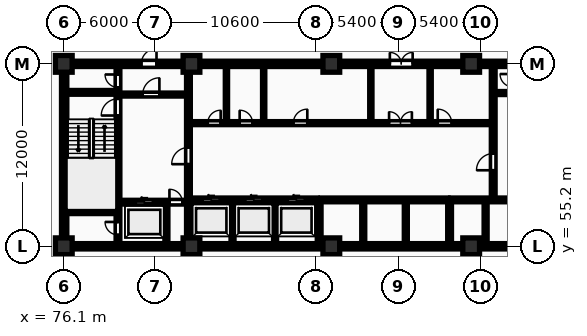
"""IFC4 building model, lengths in metres.
Left out: names, types, materials, properties, quantities, classifications, styles, units other than length and angle.
Written with IfcOpenShell. Run it as: python <this file> out.ifc"""

import sys

from ifc_helpers import new_model, si_unit, direction, frame, frame_2d, origin, origin_2d, place, context, subcontext, project, spatial, rectangle, extrude, element, fill, save


model = new_model("IFC4")
c1 = context("Model", 3, precision=1e-05, world=origin(), true_north=direction((0.0, 1.0)))
c2 = subcontext(c1, "Body", "Model", "MODEL_VIEW")
j1 = project(units=[si_unit("LENGTHUNIT", "METRE"), si_unit("PLANEANGLEUNIT", "RADIAN")], contexts=[c1])
p1 = place(None, origin())
s1 = spatial("IfcSite", under=j1, at=p1, CompositionType="ELEMENT")
p2 = place(p1, origin())
s2 = spatial("IfcBuilding", under=s1, at=p2, CompositionType="ELEMENT")
p3 = place(p2, frame((0.0, 0.0, -10.8)))
s3 = spatial("IfcBuildingStorey", under=s2, at=p3, CompositionType="ELEMENT", Elevation=-10.8)
for number, where, z_axis, x_axis in (
    (1, (76.1, 55.2, -0.45), (0.0, 0.0, 1.0), (1.0, 0.0, 0.0)),
    (2, (76.1, 67.2, -0.45), (0.0, 0.0, 1.0), (1.0, 0.0, 0.0)),
    (3, (84.5, 55.2, -0.45), (0.0, 0.0, 1.0), (1.0, 0.0, 0.0)),
    (4, (84.5, 67.2, -0.45), (0.0, 0.0, 1.0), (1.0, 0.0, 0.0)),
    (5, (93.7, 55.2, -0.45), (0.0, 0.0, 1.0), (1.0, 0.0, 0.0)),
    (6, (93.7, 67.2, -0.45), (0.0, 0.0, 1.0), (1.0, 0.0, 0.0)),
    (7, (102.9, 55.2, -0.45), (0.0, 0.0, 1.0), (1.0, 0.0, 0.0)),
    (8, (102.9, 67.2, -0.45), (0.0, 0.0, 1.0), (1.0, 0.0, 0.0)),
):
    element("IfcColumn", number, at=place(p3, frame(where, z_axis=z_axis, x_axis=x_axis)), inside=s3, PredefinedType="COLUMN", context=c2, shape_type="SweptSolid", body=[
        extrude(rectangle(XDim=1.1, YDim=1.1, at=origin_2d()), origin(), (0.0, 0.0, 1.0), 4.05),
    ])
p4 = place(p3, frame((75.95, 55.2, 0.0), z_axis=(0.0, 0.0, 1.0), x_axis=(1.0, 0.0, 0.0)))
e9 = element("IfcWall", 9, at=p4, inside=s3, PredefinedType="SHEAR", context=c2, shape_type="SweptSolid", body=[
    extrude(rectangle(XDim=36.3, YDim=0.35, at=frame_2d((18.15, 0.0))), origin(), (0.0, 0.0, 1.0), 3.6),
])
p5 = place(p3, frame((76.125, 55.375, 0.0), z_axis=(0.0, 0.0, 1.0), x_axis=(0.0, 1.0, 0.0)))
e10 = element("IfcWall", 10, at=p5, inside=s3, PredefinedType="SHEAR", context=c2, shape_type="SweptSolid", body=[
    extrude(rectangle(XDim=11.65, YDim=0.35, at=frame_2d((5.825, 0.0))), origin(), (0.0, 0.0, 1.0), 3.6),
])
p6 = place(p3, frame((75.95, 67.2, 0.0), z_axis=(0.0, 0.0, 1.0), x_axis=(1.0, 0.0, 0.0)))
e11 = element("IfcWall", 11, at=p6, inside=s3, PredefinedType="SHEAR", context=c2, shape_type="SweptSolid", body=[
    extrude(rectangle(XDim=36.3, YDim=0.35, at=frame_2d((18.15, 0.0))), origin(), (0.0, 0.0, 1.0), 3.6),
])
p7 = place(p6, frame((5.25, 0.0, 0.0)))
e12 = element("IfcOpeningElement", 12, at=p7, cuts=e11, PredefinedType="OPENING", context=c2, shape_type="SweptSolid", body=[
    extrude(rectangle(XDim=1.0, YDim=2.15, at=frame_2d((0.5, 1.075))), frame((0.0, 0.185, 0.0), z_axis=(0.0, -1.0, 0.0), x_axis=(1.0, 0.0, 0.0)), (0.0, 0.0, 1.0), 0.37),
])
p8 = place(p6, frame((21.6, 0.0, 0.0)))
e13 = element("IfcOpeningElement", 13, at=p8, cuts=e11, PredefinedType="OPENING", context=c2, shape_type="SweptSolid", body=[
    extrude(rectangle(XDim=1.5, YDim=2.2, at=frame_2d((0.75, 1.1))), frame((0.0, 0.185, 0.0), z_axis=(0.0, -1.0, 0.0), x_axis=(1.0, 0.0, 0.0)), (0.0, 0.0, 1.0), 0.37),
])
p9 = place(p6, frame((30.45, 0.0, 0.0)))
e14 = element("IfcOpeningElement", 14, at=p9, cuts=e11, PredefinedType="OPENING", context=c2, shape_type="SweptSolid", body=[
    extrude(rectangle(XDim=1.0, YDim=2.15, at=frame_2d((0.5, 1.075))), frame((0.0, 0.185, 0.0), z_axis=(0.0, -1.0, 0.0), x_axis=(1.0, 0.0, 0.0)), (0.0, 0.0, 1.0), 0.37),
])
p10 = place(p3, frame((79.665, 55.4, 0.0), z_axis=(0.0, 0.0, 1.0), x_axis=(0.0, 1.0, 0.0)))
e15 = element("IfcWall", 15, at=p10, inside=s3, PredefinedType="SHEAR", context=c2, shape_type="SweptSolid", body=[
    extrude(rectangle(XDim=11.6, YDim=0.25, at=frame_2d((5.8, 0.0))), origin(), (0.0, 0.0, 1.0), 3.6),
])
p11 = place(p10, frame((0.55, 0.0, 0.0)))
e16 = element("IfcOpeningElement", 16, at=p11, cuts=e15, PredefinedType="OPENING", context=c2, shape_type="SweptSolid", body=[
    extrude(rectangle(XDim=0.85, YDim=2.05, at=frame_2d((0.425, 1.025))), frame((0.0, 0.135, 0.0), z_axis=(0.0, -1.0, 0.0), x_axis=(1.0, 0.0, 0.0)), (0.0, 0.0, 1.0), 0.27),
])
p12 = place(p10, frame((8.4, 0.0, 0.0)))
e17 = element("IfcOpeningElement", 17, at=p12, cuts=e15, PredefinedType="OPENING", context=c2, shape_type="SweptSolid", body=[
    extrude(rectangle(XDim=1.1, YDim=2.1, at=frame_2d((0.55, 1.05))), frame((0.0, 0.135, 0.0), z_axis=(0.0, -1.0, 0.0), x_axis=(1.0, 0.0, 0.0)), (0.0, 0.0, 1.0), 0.27),
])
p13 = place(p10, frame((10.25, 0.0, 0.0)))
e18 = element("IfcOpeningElement", 18, at=p13, cuts=e15, PredefinedType="OPENING", context=c2, shape_type="SweptSolid", body=[
    extrude(rectangle(XDim=0.85, YDim=2.05, at=frame_2d((0.425, 1.025))), frame((0.0, 0.135, 0.0), z_axis=(0.0, -1.0, 0.0), x_axis=(1.0, 0.0, 0.0)), (0.0, 0.0, 1.0), 0.27),
])
for number, where, z_axis, x_axis in (
    (19, (76.3, 57.475, 0.0), (0.0, 0.0, 1.0), (1.0, 0.0, 0.0)),
    (20, (76.3, 65.325, 0.0), (0.0, 0.0, 1.0), (1.0, 0.0, 0.0)),
):
    element("IfcWall", number, at=place(p3, frame(where, z_axis=z_axis, x_axis=x_axis)), inside=s3, PredefinedType="SHEAR", context=c2, shape_type="SweptSolid", body=[
        extrude(rectangle(XDim=3.24, YDim=0.25, at=frame_2d((1.62, 0.0))), origin(), (0.0, 0.0, 1.0), 3.6),
    ])
p14 = place(p3, frame((79.79, 58.1, 0.0), z_axis=(0.0, 0.0, 1.0), x_axis=(1.0, 0.0, 0.0)))
e21 = element("IfcWall", 21, at=p14, inside=s3, PredefinedType="SHEAR", context=c2, shape_type="SweptSolid", body=[
    extrude(rectangle(XDim=4.39, YDim=0.25, at=frame_2d((2.195, 0.0))), origin(), (0.0, 0.0, 1.0), 3.6),
])
p15 = place(p14, frame((1.05, 0.0, 0.0)))
e22 = element("IfcOpeningElement", 22, at=p15, cuts=e21, PredefinedType="OPENING", context=c2, shape_type="SweptSolid", body=[
    extrude(rectangle(XDim=1.12, YDim=2.12, at=frame_2d((0.56, 1.06))), frame((0.0, 0.135, 0.0), z_axis=(0.0, -1.0, 0.0), x_axis=(1.0, 0.0, 0.0)), (0.0, 0.0, 1.0), 0.27),
])
p16 = place(p14, frame((3.26, 0.0, 0.0)))
e23 = element("IfcOpeningElement", 23, at=p16, cuts=e21, PredefinedType="OPENING", context=c2, shape_type="SweptSolid", body=[
    extrude(rectangle(XDim=0.85, YDim=2.05, at=frame_2d((0.425, 1.025))), frame((0.0, 0.135, 0.0), z_axis=(0.0, -1.0, 0.0), x_axis=(1.0, 0.0, 0.0)), (0.0, 0.0, 1.0), 0.27),
])
p17 = place(p3, frame((82.85, 55.4, 0.0), z_axis=(0.0, 0.0, 1.0), x_axis=(0.0, 1.0, 0.0)))
e24 = element("IfcWall", 24, at=p17, inside=s3, PredefinedType="PARTITIONING", context=c2, shape_type="SweptSolid", body=[
    extrude(rectangle(XDim=2.56, YDim=0.2, at=frame_2d((1.28, 0.0))), origin(), (0.0, 0.0, 1.0), 3.3),
])
p18 = place(p3, frame((79.79, 65.18, 0.0), z_axis=(0.0, 0.0, 1.0), x_axis=(1.0, 0.0, 0.0)))
e25 = element("IfcWall", 25, at=p18, inside=s3, PredefinedType="PARTITIONING", context=c2, shape_type="SweptSolid", body=[
    extrude(rectangle(XDim=4.39, YDim=0.2, at=frame_2d((2.195, 0.0))), origin(), (0.0, 0.0, 1.0), 3.3),
])
p19 = place(p18, frame((1.5, 0.0, 0.0)))
e26 = element("IfcOpeningElement", 26, at=p19, cuts=e25, PredefinedType="OPENING", context=c2, shape_type="SweptSolid", body=[
    extrude(rectangle(XDim=1.1, YDim=2.1, at=frame_2d((0.55, 1.05))), frame((0.0, 0.11, 0.0), z_axis=(0.0, -1.0, 0.0), x_axis=(1.0, 0.0, 0.0)), (0.0, 0.0, 1.0), 0.22),
])
p20 = place(p3, frame((84.3, 55.4, 0.0), z_axis=(0.0, 0.0, 1.0), x_axis=(0.0, 1.0, 0.0)))
e27 = element("IfcWall", 27, at=p20, inside=s3, PredefinedType="SHEAR", context=c2, shape_type="SweptSolid", body=[
    extrude(rectangle(XDim=11.6, YDim=0.25, at=frame_2d((5.8, 0.0))), origin(), (0.0, 0.0, 1.0), 3.6),
])
p21 = place(p20, frame((5.2, 0.0, 0.0)))
e28 = element("IfcOpeningElement", 28, at=p21, cuts=e27, PredefinedType="OPENING", context=c2, shape_type="SweptSolid", body=[
    extrude(rectangle(XDim=1.1, YDim=2.1, at=frame_2d((0.55, 1.05))), frame((0.0, 0.135, 0.0), z_axis=(0.0, -1.0, 0.0), x_axis=(1.0, 0.0, 0.0)), (0.0, 0.0, 1.0), 0.27),
])
for number, where, z_axis, x_axis in (
    (29, (87.2, 55.4, 0.0), (0.0, 0.0, 1.0), (0.0, 1.0, 0.0)),
    (30, (90.0, 55.4, 0.0), (0.0, 0.0, 1.0), (0.0, 1.0, 0.0)),
):
    element("IfcWall", number, at=place(p3, frame(where, z_axis=z_axis, x_axis=x_axis)), inside=s3, PredefinedType="PARTITIONING", context=c2, shape_type="SweptSolid", body=[
        extrude(rectangle(XDim=2.72, YDim=0.2, at=frame_2d((1.36, 0.0))), origin(), (0.0, 0.0, 1.0), 3.3),
    ])
p22 = place(p3, frame((84.42, 58.25, 0.0), z_axis=(0.0, 0.0, 1.0), x_axis=(1.0, 0.0, 0.0)))
e31 = element("IfcWall", 31, at=p22, inside=s3, PredefinedType="SHEAR", context=c2, shape_type="SweptSolid", body=[
    extrude(rectangle(XDim=8.36, YDim=0.25, at=frame_2d((4.18, 0.0))), origin(), (0.0, 0.0, 1.0), 3.6),
])
p23 = place(p22, frame((0.82, 0.0, 0.0)))
e32 = element("IfcOpeningElement", 32, at=p23, cuts=e31, PredefinedType="OPENING", context=c2, shape_type="SweptSolid", body=[
    extrude(rectangle(XDim=1.12, YDim=2.12, at=frame_2d((0.56, 1.06))), frame((0.0, 0.135, 0.0), z_axis=(0.0, -1.0, 0.0), x_axis=(1.0, 0.0, 0.0)), (0.0, 0.0, 1.0), 0.27),
])
p24 = place(p22, frame((3.62, 0.0, 0.0)))
e33 = element("IfcOpeningElement", 33, at=p24, cuts=e31, PredefinedType="OPENING", context=c2, shape_type="SweptSolid", body=[
    extrude(rectangle(XDim=1.12, YDim=2.12, at=frame_2d((0.56, 1.06))), frame((0.0, 0.135, 0.0), z_axis=(0.0, -1.0, 0.0), x_axis=(1.0, 0.0, 0.0)), (0.0, 0.0, 1.0), 0.27),
])
p25 = place(p22, frame((6.42, 0.0, 0.0)))
e34 = element("IfcOpeningElement", 34, at=p25, cuts=e31, PredefinedType="OPENING", context=c2, shape_type="SweptSolid", body=[
    extrude(rectangle(XDim=1.12, YDim=2.12, at=frame_2d((0.56, 1.06))), frame((0.0, 0.135, 0.0), z_axis=(0.0, -1.0, 0.0), x_axis=(1.0, 0.0, 0.0)), (0.0, 0.0, 1.0), 0.27),
])
p26 = place(p3, frame((92.9, 55.4, 0.0), z_axis=(0.0, 0.0, 1.0), x_axis=(0.0, 1.0, 0.0)))
e35 = element("IfcWall", 35, at=p26, inside=s3, PredefinedType="SHEAR", context=c2, shape_type="SweptSolid", body=[
    extrude(rectangle(XDim=2.85, YDim=0.25, at=frame_2d((1.425, 0.0))), origin(), (0.0, 0.0, 1.0), 3.6),
])
for number, where, z_axis, x_axis in (
    (36, (95.8, 55.4, 0.0), (0.0, 0.0, 1.0), (0.0, 1.0, 0.0)),
    (37, (98.6, 55.4, 0.0), (0.0, 0.0, 1.0), (0.0, 1.0, 0.0)),
):
    element("IfcWall", number, at=place(p3, frame(where, z_axis=z_axis, x_axis=x_axis)), inside=s3, PredefinedType="PARTITIONING", context=c2, shape_type="SweptSolid", body=[
        extrude(rectangle(XDim=2.72, YDim=0.2, at=frame_2d((1.36, 0.0))), origin(), (0.0, 0.0, 1.0), 3.3),
    ])
p27 = place(p3, frame((93.02, 58.25, 0.0), z_axis=(0.0, 0.0, 1.0), x_axis=(1.0, 0.0, 0.0)))
e38 = element("IfcWall", 38, at=p27, inside=s3, PredefinedType="SHEAR", context=c2, shape_type="SweptSolid", body=[
    extrude(rectangle(XDim=8.36, YDim=0.25, at=frame_2d((4.18, 0.0))), origin(), (0.0, 0.0, 1.0), 3.6),
])
p28 = place(p3, frame((101.48, 55.4, 0.0), z_axis=(0.0, 0.0, 1.0), x_axis=(0.0, 1.0, 0.0)))
e39 = element("IfcWall", 39, at=p28, inside=s3, PredefinedType="SHEAR", context=c2, shape_type="SweptSolid", body=[
    extrude(rectangle(XDim=2.85, YDim=0.25, at=frame_2d((1.425, 0.0))), origin(), (0.0, 0.0, 1.0), 3.6),
])
p29 = place(p3, frame((103.85, 55.4, 0.0), z_axis=(0.0, 0.0, 1.0), x_axis=(0.0, 1.0, 0.0)))
e40 = element("IfcWall", 40, at=p29, inside=s3, PredefinedType="PARTITIONING", context=c2, shape_type="SweptSolid", body=[
    extrude(rectangle(XDim=2.72, YDim=0.2, at=frame_2d((1.36, 0.0))), origin(), (0.0, 0.0, 1.0), 3.3),
])
p30 = place(p3, frame((101.55, 58.25, 0.0), z_axis=(0.0, 0.0, 1.0), x_axis=(1.0, 0.0, 0.0)))
e41 = element("IfcWall", 41, at=p30, inside=s3, PredefinedType="SHEAR", context=c2, shape_type="SweptSolid", body=[
    extrude(rectangle(XDim=4.6, YDim=0.25, at=frame_2d((2.3, 0.0))), origin(), (0.0, 0.0, 1.0), 3.6),
])
for number, where, z_axis, x_axis in (
    (42, (86.8, 63.4, 0.0), (0.0, 0.0, 1.0), (0.0, 1.0, 0.0)),
    (43, (89.25, 63.4, 0.0), (0.0, 0.0, 1.0), (0.0, 1.0, 0.0)),
    (44, (96.3, 63.4, 0.0), (0.0, 0.0, 1.0), (0.0, 1.0, 0.0)),
    (45, (100.2, 63.4, 0.0), (0.0, 0.0, 1.0), (0.0, 1.0, 0.0)),
):
    element("IfcWall", number, at=place(p3, frame(where, z_axis=z_axis, x_axis=x_axis)), inside=s3, PredefinedType="PARTITIONING", context=c2, shape_type="SweptSolid", body=[
        extrude(rectangle(XDim=3.6, YDim=0.15, at=frame_2d((1.8, 0.0))), origin(), (0.0, 0.0, 1.0), 3.3),
    ])
p31 = place(p3, frame((84.42, 63.3, 0.0), z_axis=(0.0, 0.0, 1.0), x_axis=(1.0, 0.0, 0.0)))
e46 = element("IfcWall", 46, at=p31, inside=s3, PredefinedType="PARTITIONING", context=c2, shape_type="SweptSolid", body=[
    extrude(rectangle(XDim=19.83, YDim=0.2, at=frame_2d((9.915, 0.0))), origin(), (0.0, 0.0, 1.0), 3.3),
])
p32 = place(p31, frame((1.15, 0.0, 0.0)))
e47 = element("IfcOpeningElement", 47, at=p32, cuts=e46, PredefinedType="OPENING", context=c2, shape_type="SweptSolid", body=[
    extrude(rectangle(XDim=0.85, YDim=2.05, at=frame_2d((0.425, 1.025))), frame((0.0, 0.11, 0.0), z_axis=(0.0, -1.0, 0.0), x_axis=(1.0, 0.0, 0.0)), (0.0, 0.0, 1.0), 0.22),
])
p33 = place(p31, frame((3.25, 0.0, 0.0)))
e48 = element("IfcOpeningElement", 48, at=p33, cuts=e46, PredefinedType="OPENING", context=c2, shape_type="SweptSolid", body=[
    extrude(rectangle(XDim=0.85, YDim=2.05, at=frame_2d((0.425, 1.025))), frame((0.0, 0.11, 0.0), z_axis=(0.0, -1.0, 0.0), x_axis=(1.0, 0.0, 0.0)), (0.0, 0.0, 1.0), 0.22),
])
p34 = place(p31, frame((13.08, 0.0, 0.0)))
e49 = element("IfcOpeningElement", 49, at=p34, cuts=e46, PredefinedType="OPENING", context=c2, shape_type="SweptSolid", body=[
    extrude(rectangle(XDim=1.5, YDim=2.2, at=frame_2d((0.75, 1.1))), frame((0.0, 0.11, 0.0), z_axis=(0.0, -1.0, 0.0), x_axis=(1.0, 0.0, 0.0)), (0.0, 0.0, 1.0), 0.22),
])
p35 = place(p31, frame((6.78, 0.0, 0.0)))
e50 = element("IfcOpeningElement", 50, at=p35, cuts=e46, PredefinedType="OPENING", context=c2, shape_type="SweptSolid", body=[
    extrude(rectangle(XDim=0.92, YDim=2.08, at=frame_2d((0.46, 1.04))), frame((0.0, 0.11, 0.0), z_axis=(0.0, -1.0, 0.0), x_axis=(1.0, 0.0, 0.0)), (0.0, 0.0, 1.0), 0.22),
])
p36 = place(p31, frame((16.28, 0.0, 0.0)))
e51 = element("IfcOpeningElement", 51, at=p36, cuts=e46, PredefinedType="OPENING", context=c2, shape_type="SweptSolid", body=[
    extrude(rectangle(XDim=0.92, YDim=2.08, at=frame_2d((0.46, 1.04))), frame((0.0, 0.11, 0.0), z_axis=(0.0, -1.0, 0.0), x_axis=(1.0, 0.0, 0.0)), (0.0, 0.0, 1.0), 0.22),
])
p37 = place(p3, frame((104.45, 65.28, 0.0), z_axis=(0.0, 0.0, 1.0), x_axis=(1.0, 0.0, 0.0)))
e52 = element("IfcWall", 52, at=p37, inside=s3, PredefinedType="PARTITIONING", context=c2, shape_type="SweptSolid", body=[
    extrude(rectangle(XDim=1.2, YDim=0.2, at=frame_2d((0.6, 0.0))), origin(), (0.0, 0.0, 1.0), 3.3),
])
p38 = place(p3, frame((104.35, 58.4, 0.0), z_axis=(0.0, 0.0, 1.0), x_axis=(0.0, 1.0, 0.0)))
e53 = element("IfcWall", 53, at=p38, inside=s3, PredefinedType="SHEAR", context=c2, shape_type="SweptSolid", body=[
    extrude(rectangle(XDim=8.6, YDim=0.25, at=frame_2d((4.3, 0.0))), origin(), (0.0, 0.0, 1.0), 3.6),
])
p39 = place(p38, frame((1.8, 0.0, 0.0)))
e54 = element("IfcOpeningElement", 54, at=p39, cuts=e53, PredefinedType="OPENING", context=c2, shape_type="SweptSolid", body=[
    extrude(rectangle(XDim=1.1, YDim=2.1, at=frame_2d((0.55, 1.05))), frame((0.0, 0.135, 0.0), z_axis=(0.0, -1.0, 0.0), x_axis=(1.0, 0.0, 0.0)), (0.0, 0.0, 1.0), 0.27),
])
p40 = place(p7, origin())
e55 = element("IfcDoor", 55, at=p40, inside=s3, OperationType="SINGLE_SWING_RIGHT", PredefinedType="DOOR", context=c2, shape_type="SweptSolid", body=[
    extrude(rectangle(XDim=1.0, YDim=2.15, at=frame_2d((0.5, 1.075))), frame((0.0, 0.025, 0.0), z_axis=(0.0, -1.0, 0.0), x_axis=(1.0, 0.0, 0.0)), (0.0, 0.0, 1.0), 0.05),
])
fill(e12, e55)
p41 = place(p8, origin())
e56 = element("IfcDoor", 56, at=p41, inside=s3, OperationType="DOUBLE_DOOR_SINGLE_SWING", PredefinedType="DOOR", context=c2, shape_type="SweptSolid", body=[
    extrude(rectangle(XDim=1.5, YDim=2.2, at=frame_2d((0.75, 1.1))), frame((0.0, 0.025, 0.0), z_axis=(0.0, -1.0, 0.0), x_axis=(1.0, 0.0, 0.0)), (0.0, 0.0, 1.0), 0.05),
])
fill(e13, e56)
p42 = place(p11, origin())
e57 = element("IfcDoor", 57, at=p42, inside=s3, OperationType="SINGLE_SWING_RIGHT", PredefinedType="DOOR", context=c2, shape_type="SweptSolid", body=[
    extrude(rectangle(XDim=0.85, YDim=2.05, at=frame_2d((0.425, 1.025))), frame((0.0, 0.025, 0.0), z_axis=(0.0, -1.0, 0.0), x_axis=(1.0, 0.0, 0.0)), (0.0, 0.0, 1.0), 0.05),
])
fill(e16, e57)
p43 = place(p12, origin())
e58 = element("IfcDoor", 58, at=p43, inside=s3, OperationType="SINGLE_SWING_LEFT", PredefinedType="DOOR", context=c2, shape_type="SweptSolid", body=[
    extrude(rectangle(XDim=1.1, YDim=2.1, at=frame_2d((0.55, 1.05))), frame((0.0, 0.025, 0.0), z_axis=(0.0, -1.0, 0.0), x_axis=(1.0, 0.0, 0.0)), (0.0, 0.0, 1.0), 0.05),
])
fill(e17, e58)
p44 = place(p13, origin())
e59 = element("IfcDoor", 59, at=p44, inside=s3, OperationType="SINGLE_SWING_RIGHT", PredefinedType="DOOR", context=c2, shape_type="SweptSolid", body=[
    extrude(rectangle(XDim=0.85, YDim=2.05, at=frame_2d((0.425, 1.025))), frame((0.0, 0.025, 0.0), z_axis=(0.0, -1.0, 0.0), x_axis=(1.0, 0.0, 0.0)), (0.0, 0.0, 1.0), 0.05),
])
fill(e18, e59)
p45 = place(p15, origin())
e60 = element("IfcDoor", 60, at=p45, inside=s3, OperationType="SLIDING_TO_LEFT", PredefinedType="DOOR", context=c2, shape_type="SweptSolid", body=[
    extrude(rectangle(XDim=1.12, YDim=2.12, at=frame_2d((0.56, 1.06))), frame((0.0, 0.025, 0.0), z_axis=(0.0, -1.0, 0.0), x_axis=(1.0, 0.0, 0.0)), (0.0, 0.0, 1.0), 0.05),
])
fill(e22, e60)
p46 = place(p16, origin())
e61 = element("IfcDoor", 61, at=p46, inside=s3, OperationType="SINGLE_SWING_LEFT", PredefinedType="DOOR", context=c2, shape_type="SweptSolid", body=[
    extrude(rectangle(XDim=0.85, YDim=2.05, at=frame_2d((0.425, 1.025))), frame((0.0, 0.025, 0.0), z_axis=(0.0, -1.0, 0.0), x_axis=(1.0, 0.0, 0.0)), (0.0, 0.0, 1.0), 0.05),
])
fill(e23, e61)
p47 = place(p19, origin())
e62 = element("IfcDoor", 62, at=p47, inside=s3, OperationType="SINGLE_SWING_RIGHT", PredefinedType="DOOR", context=c2, shape_type="SweptSolid", body=[
    extrude(rectangle(XDim=1.1, YDim=2.1, at=frame_2d((0.55, 1.05))), frame((0.0, 0.025, 0.0), z_axis=(0.0, -1.0, 0.0), x_axis=(1.0, 0.0, 0.0)), (0.0, 0.0, 1.0), 0.05),
])
fill(e26, e62)
p48 = place(p21, origin())
e63 = element("IfcDoor", 63, at=p48, inside=s3, OperationType="SINGLE_SWING_LEFT", PredefinedType="DOOR", context=c2, shape_type="SweptSolid", body=[
    extrude(rectangle(XDim=1.1, YDim=2.1, at=frame_2d((0.55, 1.05))), frame((0.0, 0.025, 0.0), z_axis=(0.0, -1.0, 0.0), x_axis=(1.0, 0.0, 0.0)), (0.0, 0.0, 1.0), 0.05),
])
fill(e28, e63)
p49 = place(p23, origin())
e64 = element("IfcDoor", 64, at=p49, inside=s3, OperationType="SLIDING_TO_LEFT", PredefinedType="DOOR", context=c2, shape_type="SweptSolid", body=[
    extrude(rectangle(XDim=1.12, YDim=2.12, at=frame_2d((0.56, 1.06))), frame((0.0, 0.025, 0.0), z_axis=(0.0, -1.0, 0.0), x_axis=(1.0, 0.0, 0.0)), (0.0, 0.0, 1.0), 0.05),
])
fill(e32, e64)
p50 = place(p24, origin())
e65 = element("IfcDoor", 65, at=p50, inside=s3, OperationType="SLIDING_TO_LEFT", PredefinedType="DOOR", context=c2, shape_type="SweptSolid", body=[
    extrude(rectangle(XDim=1.12, YDim=2.12, at=frame_2d((0.56, 1.06))), frame((0.0, 0.025, 0.0), z_axis=(0.0, -1.0, 0.0), x_axis=(1.0, 0.0, 0.0)), (0.0, 0.0, 1.0), 0.05),
])
fill(e33, e65)
p51 = place(p25, origin())
e66 = element("IfcDoor", 66, at=p51, inside=s3, OperationType="SLIDING_TO_LEFT", PredefinedType="DOOR", context=c2, shape_type="SweptSolid", body=[
    extrude(rectangle(XDim=1.12, YDim=2.12, at=frame_2d((0.56, 1.06))), frame((0.0, 0.025, 0.0), z_axis=(0.0, -1.0, 0.0), x_axis=(1.0, 0.0, 0.0)), (0.0, 0.0, 1.0), 0.05),
])
fill(e34, e66)
p52 = place(p32, origin())
e67 = element("IfcDoor", 67, at=p52, inside=s3, OperationType="SINGLE_SWING_RIGHT", PredefinedType="DOOR", context=c2, shape_type="SweptSolid", body=[
    extrude(rectangle(XDim=0.85, YDim=2.05, at=frame_2d((0.425, 1.025))), frame((0.0, 0.025, 0.0), z_axis=(0.0, -1.0, 0.0), x_axis=(1.0, 0.0, 0.0)), (0.0, 0.0, 1.0), 0.05),
])
fill(e47, e67)
p53 = place(p33, origin())
e68 = element("IfcDoor", 68, at=p53, inside=s3, OperationType="SINGLE_SWING_LEFT", PredefinedType="DOOR", context=c2, shape_type="SweptSolid", body=[
    extrude(rectangle(XDim=0.85, YDim=2.05, at=frame_2d((0.425, 1.025))), frame((0.0, 0.025, 0.0), z_axis=(0.0, -1.0, 0.0), x_axis=(1.0, 0.0, 0.0)), (0.0, 0.0, 1.0), 0.05),
])
fill(e48, e68)
p54 = place(p34, origin())
e69 = element("IfcDoor", 69, at=p54, inside=s3, OperationType="DOUBLE_DOOR_SINGLE_SWING", PredefinedType="DOOR", context=c2, shape_type="SweptSolid", body=[
    extrude(rectangle(XDim=1.5, YDim=2.2, at=frame_2d((0.75, 1.1))), frame((0.0, 0.025, 0.0), z_axis=(0.0, -1.0, 0.0), x_axis=(1.0, 0.0, 0.0)), (0.0, 0.0, 1.0), 0.05),
])
fill(e49, e69)
p55 = place(p35, origin())
e70 = element("IfcDoor", 70, at=p55, inside=s3, OperationType="SINGLE_SWING_RIGHT", PredefinedType="DOOR", context=c2, shape_type="SweptSolid", body=[
    extrude(rectangle(XDim=0.92, YDim=2.08, at=frame_2d((0.46, 1.04))), frame((0.0, 0.025, 0.0), z_axis=(0.0, -1.0, 0.0), x_axis=(1.0, 0.0, 0.0)), (0.0, 0.0, 1.0), 0.05),
])
fill(e50, e70)
p56 = place(p36, origin())
e71 = element("IfcDoor", 71, at=p56, inside=s3, OperationType="SINGLE_SWING_LEFT", PredefinedType="DOOR", context=c2, shape_type="SweptSolid", body=[
    extrude(rectangle(XDim=0.92, YDim=2.08, at=frame_2d((0.46, 1.04))), frame((0.0, 0.025, 0.0), z_axis=(0.0, -1.0, 0.0), x_axis=(1.0, 0.0, 0.0)), (0.0, 0.0, 1.0), 0.05),
])
fill(e51, e71)
p57 = place(p39, origin())
e72 = element("IfcDoor", 72, at=p57, inside=s3, OperationType="SINGLE_SWING_LEFT", PredefinedType="DOOR", context=c2, shape_type="SweptSolid", body=[
    extrude(rectangle(XDim=1.1, YDim=2.1, at=frame_2d((0.55, 1.05))), frame((0.0, 0.025, 0.0), z_axis=(0.0, -1.0, 0.0), x_axis=(1.0, 0.0, 0.0)), (0.0, 0.0, 1.0), 0.05),
])
fill(e54, e72)
save(model, sys.argv[1])
